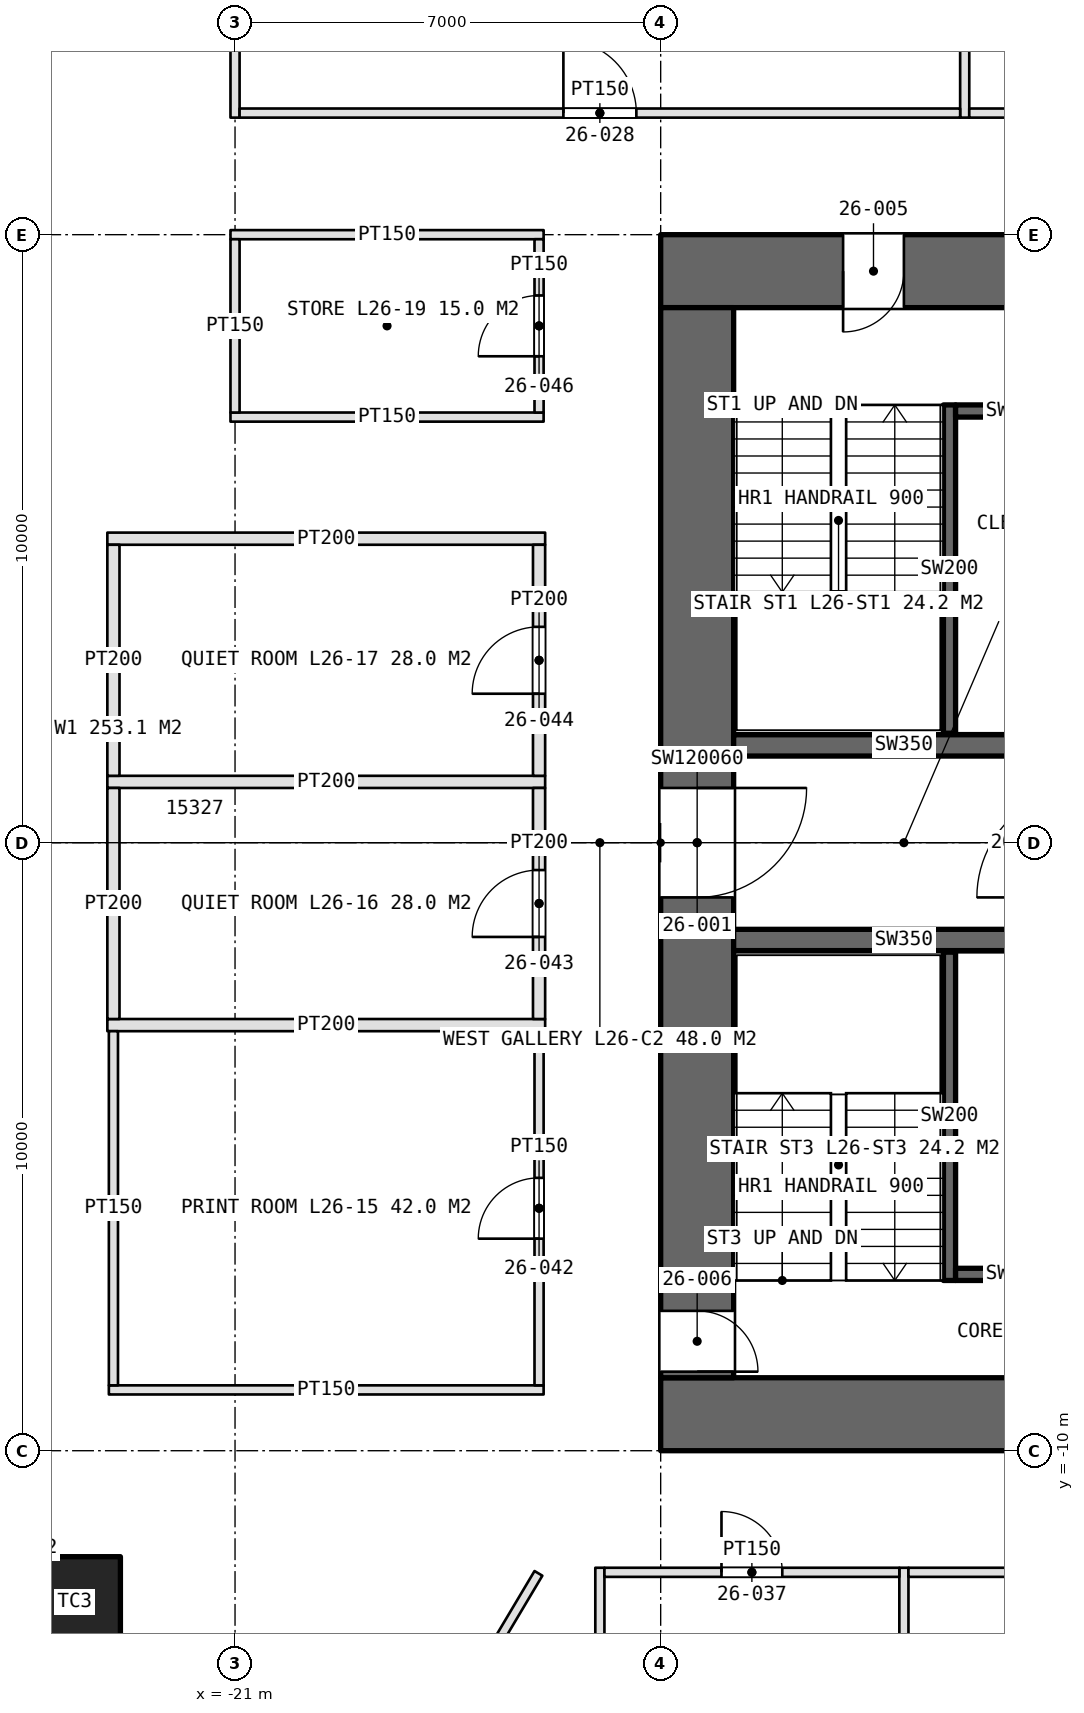
"""IFC4 building model, lengths in metres.
Left out: names, types, materials, properties, quantities, classifications, styles, units other than length and angle.
Written with IfcOpenShell. Run it as: python <this file> out.ifc"""

import sys

from ifc_helpers import new_model, si_unit, direction, frame, frame_2d, origin, origin_2d, place, context, subcontext, project, spatial, rectangle, extrude, element, fill, save


model = new_model("IFC4")
c1 = context("Model", 3, precision=1e-05, world=origin(), true_north=direction((0.0, 1.0)))
c2 = subcontext(c1, "Body", "Model", "MODEL_VIEW")
j1 = project(units=[si_unit("LENGTHUNIT", "METRE"), si_unit("PLANEANGLEUNIT", "RADIAN")], contexts=[c1])
p1 = place(None, origin())
s1 = spatial("IfcSite", under=j1, at=p1, CompositionType="ELEMENT")
p2 = place(p1, origin())
s2 = spatial("IfcBuilding", under=s1, at=p2, CompositionType="ELEMENT")
p3 = place(p2, frame((0.0, 0.0, 126.0)))
s3 = spatial("IfcBuildingStorey", under=s2, at=p3, CompositionType="ELEMENT", Elevation=126.0)
p4 = place(p3, frame((-14.0, -9.4, 0.0), z_axis=(0.0, 0.0, 1.0), x_axis=(1.0, 0.0, 0.0)))
e1 = element("IfcWall", 1, at=p4, inside=s3, PredefinedType="SHEAR", context=c2, shape_type="SweptSolid", body=[
    extrude(rectangle(XDim=28.0, YDim=1.2, at=frame_2d((14.0, 0.0))), origin(), (0.0, 0.0, 1.0), 4.2),
])
p5 = place(p4, frame((13.1, 0.0, 0.0)))
e2 = element("IfcOpeningElement", 2, at=p5, cuts=e1, PredefinedType="OPENING", context=c2, shape_type="SweptSolid", body=[
    extrude(rectangle(XDim=1.8, YDim=2.4, at=frame_2d((0.9, 1.2))), frame((0.0, 0.61, 0.0), z_axis=(0.0, -1.0, 0.0), x_axis=(1.0, 0.0, 0.0)), (0.0, 0.0, 1.0), 1.22),
])
p6 = place(p4, frame((22.9, 0.0, 0.0)))
e3 = element("IfcOpeningElement", 3, at=p6, cuts=e1, PredefinedType="OPENING", context=c2, shape_type="SweptSolid", body=[
    extrude(rectangle(XDim=2.2, YDim=2.7, at=frame_2d((1.1, 1.35))), frame((0.0, 0.61, 0.0), z_axis=(0.0, -1.0, 0.0), x_axis=(1.0, 0.0, 0.0)), (0.0, 0.0, 1.0), 1.22),
])
p7 = place(p3, frame((14.0, 9.4, 0.0), z_axis=(0.0, 0.0, 1.0), x_axis=(-1.0, 0.0, 0.0)))
e4 = element("IfcWall", 4, at=p7, inside=s3, PredefinedType="SHEAR", context=c2, shape_type="SweptSolid", body=[
    extrude(rectangle(XDim=28.0, YDim=1.2, at=frame_2d((14.0, 0.0))), origin(), (0.0, 0.0, 1.0), 4.2),
])
p8 = place(p7, frame((24.0, 0.0, 0.0)))
e5 = element("IfcOpeningElement", 5, at=p8, cuts=e4, PredefinedType="OPENING", context=c2, shape_type="SweptSolid", body=[
    extrude(rectangle(XDim=1.0, YDim=2.4, at=frame_2d((0.5, 1.2))), frame((0.0, 0.61, 0.0), z_axis=(0.0, -1.0, 0.0), x_axis=(1.0, 0.0, 0.0)), (0.0, 0.0, 1.0), 1.22),
])
p9 = place(p7, frame((13.1, 0.0, 0.0)))
e6 = element("IfcOpeningElement", 6, at=p9, cuts=e4, PredefinedType="OPENING", context=c2, shape_type="SweptSolid", body=[
    extrude(rectangle(XDim=1.8, YDim=2.4, at=frame_2d((0.9, 1.2))), frame((0.0, 0.61, 0.0), z_axis=(0.0, -1.0, 0.0), x_axis=(1.0, 0.0, 0.0)), (0.0, 0.0, 1.0), 1.22),
])
p10 = place(p3, frame((-13.4, 8.8, 0.0), z_axis=(0.0, 0.0, 1.0), x_axis=(0.0, -1.0, 0.0)))
e7 = element("IfcWall", 7, at=p10, inside=s3, PredefinedType="SHEAR", context=c2, shape_type="SweptSolid", body=[
    extrude(rectangle(XDim=17.6, YDim=1.2, at=frame_2d((8.8, 0.0))), origin(), (0.0, 0.0, 1.0), 4.2),
])
p11 = place(p10, frame((7.9, 0.0, 0.0)))
e8 = element("IfcOpeningElement", 8, at=p11, cuts=e7, PredefinedType="OPENING", context=c2, shape_type="SweptSolid", body=[
    extrude(rectangle(XDim=1.8, YDim=2.4, at=frame_2d((0.9, 1.2))), frame((0.0, 0.61, 0.0), z_axis=(0.0, -1.0, 0.0), x_axis=(1.0, 0.0, 0.0)), (0.0, 0.0, 1.0), 1.22),
])
p12 = place(p10, frame((16.5, 0.0, 0.0)))
e9 = element("IfcOpeningElement", 9, at=p12, cuts=e7, PredefinedType="OPENING", context=c2, shape_type="SweptSolid", body=[
    extrude(rectangle(XDim=1.0, YDim=2.4, at=frame_2d((0.5, 1.2))), frame((0.0, 0.61, 0.0), z_axis=(0.0, -1.0, 0.0), x_axis=(1.0, 0.0, 0.0)), (0.0, 0.0, 1.0), 1.22),
])
for number, where, z_axis, x_axis in (
    (10, (-12.8, 1.6, 0.0), (0.0, 0.0, 1.0), (1.0, 0.0, 0.0)),
    (11, (-12.8, -1.6, 0.0), (0.0, 0.0, 1.0), (1.0, 0.0, 0.0)),
):
    element("IfcWall", number, at=place(p3, frame(where, z_axis=z_axis, x_axis=x_axis)), inside=s3, PredefinedType="SHEAR", context=c2, shape_type="SweptSolid", body=[
        extrude(rectangle(XDim=5.6, YDim=0.35, at=frame_2d((2.8, 0.0))), origin(), (0.0, 0.0, 1.0), 4.2),
    ])
p13 = place(p3, frame((-23.635, -12.493, 0.0), z_axis=(0.0, 0.0, 1.0), x_axis=(1.0, 0.0, 0.0)))
e12 = element("IfcColumn", 12, at=p13, inside=s3, PredefinedType="COLUMN", context=c2, shape_type="SweptSolid", body=[
    extrude(rectangle(XDim=1.5, YDim=1.5, at=origin_2d()), origin(), (0.0, 0.0, 1.0), 4.2),
])
p14 = place(p3, frame((-9.25, 7.2, 0.0), z_axis=(0.0, 0.0, 1.0), x_axis=(0.0, -1.0, 0.0)))
e13 = element("IfcWall", 13, at=p14, inside=s3, PredefinedType="SOLIDWALL", context=c2, shape_type="SweptSolid", body=[
    extrude(rectangle(XDim=5.4, YDim=0.2, at=frame_2d((2.7, 0.0))), origin(), (0.0, 0.0, 1.0), 4.2),
])
p15 = place(p3, frame((-9.15, 7.1, 0.0), z_axis=(0.0, 0.0, 1.0), x_axis=(1.0, 0.0, 0.0)))
e14 = element("IfcWall", 14, at=p15, inside=s3, PredefinedType="SOLIDWALL", context=c2, shape_type="SweptSolid", body=[
    extrude(rectangle(XDim=1.95, YDim=0.2, at=frame_2d((0.975, 0.0))), origin(), (0.0, 0.0, 1.0), 4.2),
])
p16 = place(p3, frame((-9.25, -7.2, 0.0), z_axis=(0.0, 0.0, 1.0), x_axis=(0.0, 1.0, 0.0)))
e15 = element("IfcWall", 15, at=p16, inside=s3, PredefinedType="SOLIDWALL", context=c2, shape_type="SweptSolid", body=[
    extrude(rectangle(XDim=5.4, YDim=0.2, at=frame_2d((2.7, 0.0))), origin(), (0.0, 0.0, 1.0), 4.2),
])
p17 = place(p3, frame((-9.15, -7.1, 0.0), z_axis=(0.0, 0.0, 1.0), x_axis=(1.0, 0.0, 0.0)))
e16 = element("IfcWall", 16, at=p17, inside=s3, PredefinedType="SOLIDWALL", context=c2, shape_type="SweptSolid", body=[
    extrude(rectangle(XDim=1.95, YDim=0.2, at=frame_2d((0.975, 0.0))), origin(), (0.0, 0.0, 1.0), 4.2),
])
for number, where, z_axis, x_axis in (
    (17, (-21.0, 11.925, 0.0), (0.0, 0.0, 1.0), (0.0, 1.0, 0.0)),
    (18, (-9.0, 11.925, 0.0), (0.0, 0.0, 1.0), (0.0, 1.0, 0.0)),
):
    element("IfcWall", number, at=place(p3, frame(where, z_axis=z_axis, x_axis=x_axis)), inside=s3, PredefinedType="PARTITIONING", context=c2, shape_type="SweptSolid", body=[
        extrude(rectangle(XDim=6.15, YDim=0.15, at=frame_2d((3.075, 0.0))), origin(), (0.0, 0.0, 1.0), 3.0),
    ])
p18 = place(p3, frame((-20.925, 12.0, 0.0), z_axis=(0.0, 0.0, 1.0), x_axis=(1.0, 0.0, 0.0)))
e19 = element("IfcWall", 19, at=p18, inside=s3, PredefinedType="PARTITIONING", context=c2, shape_type="SweptSolid", body=[
    extrude(rectangle(XDim=11.85, YDim=0.15, at=frame_2d((5.925, 0.0))), origin(), (0.0, 0.0, 1.0), 3.0),
])
p19 = place(p18, frame((5.325, 0.0, 0.0)))
e20 = element("IfcOpeningElement", 20, at=p19, cuts=e19, PredefinedType="OPENING", context=c2, shape_type="SweptSolid", body=[
    extrude(rectangle(XDim=1.2, YDim=2.4, at=frame_2d((0.6, 1.2))), frame((0.0, 0.085, 0.0), z_axis=(0.0, -1.0, 0.0), x_axis=(1.0, 0.0, 0.0)), (0.0, 0.0, 1.0), 0.17),
])
p20 = place(p3, frame((-8.925, 12.0, 0.0), z_axis=(0.0, 0.0, 1.0), x_axis=(1.0, 0.0, 0.0)))
e21 = element("IfcWall", 21, at=p20, inside=s3, PredefinedType="PARTITIONING", context=c2, shape_type="SweptSolid", body=[
    extrude(rectangle(XDim=4.85, YDim=0.15, at=frame_2d((2.425, 0.0))), origin(), (0.0, 0.0, 1.0), 3.0),
])
p21 = place(p20, frame((1.875, 0.0, 0.0)))
e22 = element("IfcOpeningElement", 22, at=p21, cuts=e21, PredefinedType="OPENING", context=c2, shape_type="SweptSolid", body=[
    extrude(rectangle(XDim=1.1, YDim=2.3, at=frame_2d((0.55, 1.15))), frame((0.0, 0.085, 0.0), z_axis=(0.0, -1.0, 0.0), x_axis=(1.0, 0.0, 0.0)), (0.0, 0.0, 1.0), 0.17),
])
for number, where, z_axis, x_axis in (
    (23, (-15.0, -11.925, 0.0), (0.0, 0.0, 1.0), (0.0, -1.0, 0.0)),
    (24, (-10.0, -11.925, 0.0), (0.0, 0.0, 1.0), (0.0, -1.0, 0.0)),
):
    element("IfcWall", number, at=place(p3, frame(where, z_axis=z_axis, x_axis=x_axis)), inside=s3, PredefinedType="PARTITIONING", context=c2, shape_type="SweptSolid", body=[
        extrude(rectangle(XDim=8.15, YDim=0.15, at=frame_2d((4.075, 0.0))), origin(), (0.0, 0.0, 1.0), 3.0),
    ])
p22 = place(p3, frame((-14.925, -12.0, 0.0), z_axis=(0.0, 0.0, 1.0), x_axis=(1.0, 0.0, 0.0)))
e25 = element("IfcWall", 25, at=p22, inside=s3, PredefinedType="PARTITIONING", context=c2, shape_type="SweptSolid", body=[
    extrude(rectangle(XDim=4.85, YDim=0.15, at=frame_2d((2.425, 0.0))), origin(), (0.0, 0.0, 1.0), 3.0),
])
p23 = place(p22, frame((1.925, 0.0, 0.0)))
e26 = element("IfcOpeningElement", 26, at=p23, cuts=e25, PredefinedType="OPENING", context=c2, shape_type="SweptSolid", body=[
    extrude(rectangle(XDim=1.0, YDim=2.2, at=frame_2d((0.5, 1.1))), frame((0.0, 0.085, 0.0), z_axis=(0.0, -1.0, 0.0), x_axis=(1.0, 0.0, 0.0)), (0.0, 0.0, 1.0), 0.17),
])
p24 = place(p3, frame((-9.925, -12.0, 0.0), z_axis=(0.0, 0.0, 1.0), x_axis=(1.0, 0.0, 0.0)))
e27 = element("IfcWall", 27, at=p24, inside=s3, PredefinedType="PARTITIONING", context=c2, shape_type="SweptSolid", body=[
    extrude(rectangle(XDim=5.85, YDim=0.15, at=frame_2d((2.925, 0.0))), origin(), (0.0, 0.0, 1.0), 3.0),
])
p25 = place(p24, frame((2.425, 0.0, 0.0)))
e28 = element("IfcOpeningElement", 28, at=p25, cuts=e27, PredefinedType="OPENING", context=c2, shape_type="SweptSolid", body=[
    extrude(rectangle(XDim=1.0, YDim=2.2, at=frame_2d((0.5, 1.1))), frame((0.0, 0.085, 0.0), z_axis=(0.0, -1.0, 0.0), x_axis=(1.0, 0.0, 0.0)), (0.0, 0.0, 1.0), 0.17),
])
p26 = place(p3, frame((-15.925, -9.0, 0.0), z_axis=(0.0, 0.0, 1.0), x_axis=(-1.0, 0.0, 0.0)))
e29 = element("IfcWall", 29, at=p26, inside=s3, PredefinedType="PARTITIONING", context=c2, shape_type="SweptSolid", body=[
    extrude(rectangle(XDim=7.15, YDim=0.15, at=frame_2d((3.575, 0.0))), origin(), (0.0, 0.0, 1.0), 3.0),
])
for number, where, z_axis, x_axis in (
    (30, (-15.9, -3.0, 0.0), (0.0, 0.0, 1.0), (-1.0, 0.0, 0.0)),
    (31, (-15.9, 1.0, 0.0), (0.0, 0.0, 1.0), (-1.0, 0.0, 0.0)),
    (32, (-15.9, 5.0, 0.0), (0.0, 0.0, 1.0), (-1.0, 0.0, 0.0)),
):
    element("IfcWall", number, at=place(p3, frame(where, z_axis=z_axis, x_axis=x_axis)), inside=s3, PredefinedType="PARTITIONING", context=c2, shape_type="SweptSolid", body=[
        extrude(rectangle(XDim=7.2, YDim=0.2, at=frame_2d((3.6, 0.0))), origin(), (0.0, 0.0, 1.0), 3.0),
    ])
p27 = place(p3, frame((-16.0, -8.925, 0.0), z_axis=(0.0, 0.0, 1.0), x_axis=(0.0, 1.0, 0.0)))
e33 = element("IfcWall", 33, at=p27, inside=s3, PredefinedType="PARTITIONING", context=c2, shape_type="SweptSolid", body=[
    extrude(rectangle(XDim=5.825, YDim=0.15, at=frame_2d((2.913, 0.0))), origin(), (0.0, 0.0, 1.0), 3.0),
])
p28 = place(p27, frame((2.413, 0.0, 0.0)))
e34 = element("IfcOpeningElement", 34, at=p28, cuts=e33, PredefinedType="OPENING", context=c2, shape_type="SweptSolid", body=[
    extrude(rectangle(XDim=1.0, YDim=2.2, at=frame_2d((0.5, 1.1))), frame((0.0, 0.085, 0.0), z_axis=(0.0, -1.0, 0.0), x_axis=(1.0, 0.0, 0.0)), (0.0, 0.0, 1.0), 0.17),
])
p29 = place(p3, frame((-23.0, -8.925, 0.0), z_axis=(0.0, 0.0, 1.0), x_axis=(0.0, 1.0, 0.0)))
e35 = element("IfcWall", 35, at=p29, inside=s3, PredefinedType="PARTITIONING", context=c2, shape_type="SweptSolid", body=[
    extrude(rectangle(XDim=5.825, YDim=0.15, at=frame_2d((2.913, 0.0))), origin(), (0.0, 0.0, 1.0), 3.0),
])
p30 = place(p3, frame((-16.0, -2.9, 0.0), z_axis=(0.0, 0.0, 1.0), x_axis=(0.0, 1.0, 0.0)))
e36 = element("IfcWall", 36, at=p30, inside=s3, PredefinedType="PARTITIONING", context=c2, shape_type="SweptSolid", body=[
    extrude(rectangle(XDim=3.8, YDim=0.2, at=frame_2d((1.9, 0.0))), origin(), (0.0, 0.0, 1.0), 3.0),
])
p31 = place(p30, frame((1.35, 0.0, 0.0)))
e37 = element("IfcOpeningElement", 37, at=p31, cuts=e36, PredefinedType="OPENING", context=c2, shape_type="SweptSolid", body=[
    extrude(rectangle(XDim=1.1, YDim=2.3, at=frame_2d((0.55, 1.15))), frame((0.0, 0.11, 0.0), z_axis=(0.0, -1.0, 0.0), x_axis=(1.0, 0.0, 0.0)), (0.0, 0.0, 1.0), 0.22),
])
p32 = place(p3, frame((-23.0, -2.9, 0.0), z_axis=(0.0, 0.0, 1.0), x_axis=(0.0, 1.0, 0.0)))
e38 = element("IfcWall", 38, at=p32, inside=s3, PredefinedType="PARTITIONING", context=c2, shape_type="SweptSolid", body=[
    extrude(rectangle(XDim=3.8, YDim=0.2, at=frame_2d((1.9, 0.0))), origin(), (0.0, 0.0, 1.0), 3.0),
])
p33 = place(p3, frame((-16.0, 1.1, 0.0), z_axis=(0.0, 0.0, 1.0), x_axis=(0.0, 1.0, 0.0)))
e39 = element("IfcWall", 39, at=p33, inside=s3, PredefinedType="PARTITIONING", context=c2, shape_type="SweptSolid", body=[
    extrude(rectangle(XDim=3.8, YDim=0.2, at=frame_2d((1.9, 0.0))), origin(), (0.0, 0.0, 1.0), 3.0),
])
p34 = place(p33, frame((1.35, 0.0, 0.0)))
e40 = element("IfcOpeningElement", 40, at=p34, cuts=e39, PredefinedType="OPENING", context=c2, shape_type="SweptSolid", body=[
    extrude(rectangle(XDim=1.1, YDim=2.3, at=frame_2d((0.55, 1.15))), frame((0.0, 0.11, 0.0), z_axis=(0.0, -1.0, 0.0), x_axis=(1.0, 0.0, 0.0)), (0.0, 0.0, 1.0), 0.22),
])
p35 = place(p3, frame((-23.0, 1.1, 0.0), z_axis=(0.0, 0.0, 1.0), x_axis=(0.0, 1.0, 0.0)))
e41 = element("IfcWall", 41, at=p35, inside=s3, PredefinedType="PARTITIONING", context=c2, shape_type="SweptSolid", body=[
    extrude(rectangle(XDim=3.8, YDim=0.2, at=frame_2d((1.9, 0.0))), origin(), (0.0, 0.0, 1.0), 3.0),
])
for number, where, z_axis, x_axis in (
    (42, (-15.925, 7.0, 0.0), (0.0, 0.0, 1.0), (-1.0, 0.0, 0.0)),
    (43, (-15.925, 10.0, 0.0), (0.0, 0.0, 1.0), (-1.0, 0.0, 0.0)),
):
    element("IfcWall", number, at=place(p3, frame(where, z_axis=z_axis, x_axis=x_axis)), inside=s3, PredefinedType="PARTITIONING", context=c2, shape_type="SweptSolid", body=[
        extrude(rectangle(XDim=5.15, YDim=0.15, at=frame_2d((2.575, 0.0))), origin(), (0.0, 0.0, 1.0), 3.0),
    ])
p36 = place(p3, frame((-16.0, 7.075, 0.0), z_axis=(0.0, 0.0, 1.0), x_axis=(0.0, 1.0, 0.0)))
e44 = element("IfcWall", 44, at=p36, inside=s3, PredefinedType="PARTITIONING", context=c2, shape_type="SweptSolid", body=[
    extrude(rectangle(XDim=2.85, YDim=0.15, at=frame_2d((1.425, 0.0))), origin(), (0.0, 0.0, 1.0), 3.0),
])
p37 = place(p36, frame((0.925, 0.0, 0.0)))
e45 = element("IfcOpeningElement", 45, at=p37, cuts=e44, PredefinedType="OPENING", context=c2, shape_type="SweptSolid", body=[
    extrude(rectangle(XDim=1.0, YDim=2.2, at=frame_2d((0.5, 1.1))), frame((0.0, 0.085, 0.0), z_axis=(0.0, -1.0, 0.0), x_axis=(1.0, 0.0, 0.0)), (0.0, 0.0, 1.0), 0.17),
])
p38 = place(p3, frame((-21.0, 7.075, 0.0), z_axis=(0.0, 0.0, 1.0), x_axis=(0.0, 1.0, 0.0)))
e46 = element("IfcWall", 46, at=p38, inside=s3, PredefinedType="PARTITIONING", context=c2, shape_type="SweptSolid", body=[
    extrude(rectangle(XDim=2.85, YDim=0.15, at=frame_2d((1.425, 0.0))), origin(), (0.0, 0.0, 1.0), 3.0),
])
p39 = place(p3, frame((-16.01, -12.017, 0.0), z_axis=(0.0, 0.0, 1.0), x_axis=(-0.511508688443, -0.85927810495, 0.0)))
e47 = element("IfcWall", 47, at=p39, inside=s3, PredefinedType="PARTITIONING", context=c2, shape_type="SweptSolid", body=[
    extrude(rectangle(XDim=8.47, YDim=0.15, at=frame_2d((4.235, 0.0))), origin(), (0.0, 0.0, 1.0), 3.0),
])
p40 = place(p11, origin())
e48 = element("IfcDoor", 48, at=p40, inside=s3, OperationType="DOUBLE_DOOR_SINGLE_SWING", PredefinedType="DOOR", context=c2, shape_type="SweptSolid", body=[
    extrude(rectangle(XDim=1.8, YDim=2.4, at=frame_2d((0.9, 1.2))), frame((0.0, 0.025, 0.0), z_axis=(0.0, -1.0, 0.0), x_axis=(1.0, 0.0, 0.0)), (0.0, 0.0, 1.0), 0.05),
])
fill(e8, e48)
p41 = place(p8, origin())
e49 = element("IfcDoor", 49, at=p41, inside=s3, OperationType="SINGLE_SWING_RIGHT", PredefinedType="DOOR", context=c2, shape_type="SweptSolid", body=[
    extrude(rectangle(XDim=1.0, YDim=2.4, at=frame_2d((0.5, 1.2))), frame((0.0, 0.025, 0.0), z_axis=(0.0, -1.0, 0.0), x_axis=(1.0, 0.0, 0.0)), (0.0, 0.0, 1.0), 0.05),
])
fill(e5, e49)
p42 = place(p12, origin())
e50 = element("IfcDoor", 50, at=p42, inside=s3, OperationType="SINGLE_SWING_RIGHT", PredefinedType="DOOR", context=c2, shape_type="SweptSolid", body=[
    extrude(rectangle(XDim=1.0, YDim=2.4, at=frame_2d((0.5, 1.2))), frame((0.0, 0.025, 0.0), z_axis=(0.0, -1.0, 0.0), x_axis=(1.0, 0.0, 0.0)), (0.0, 0.0, 1.0), 0.05),
])
fill(e9, e50)
p43 = place(p19, origin())
e51 = element("IfcDoor", 51, at=p43, inside=s3, OperationType="SINGLE_SWING_LEFT", PredefinedType="DOOR", context=c2, shape_type="SweptSolid", body=[
    extrude(rectangle(XDim=1.2, YDim=2.4, at=frame_2d((0.6, 1.2))), frame((0.0, 0.025, 0.0), z_axis=(0.0, -1.0, 0.0), x_axis=(1.0, 0.0, 0.0)), (0.0, 0.0, 1.0), 0.05),
])
fill(e20, e51)
p44 = place(p23, origin())
e52 = element("IfcDoor", 52, at=p44, inside=s3, OperationType="SINGLE_SWING_LEFT", PredefinedType="DOOR", context=c2, shape_type="SweptSolid", body=[
    extrude(rectangle(XDim=1.0, YDim=2.2, at=frame_2d((0.5, 1.1))), frame((0.0, 0.025, 0.0), z_axis=(0.0, -1.0, 0.0), x_axis=(1.0, 0.0, 0.0)), (0.0, 0.0, 1.0), 0.05),
])
fill(e26, e52)
p45 = place(p28, origin())
e53 = element("IfcDoor", 53, at=p45, inside=s3, OperationType="SINGLE_SWING_LEFT", PredefinedType="DOOR", context=c2, shape_type="SweptSolid", body=[
    extrude(rectangle(XDim=1.0, YDim=2.2, at=frame_2d((0.5, 1.1))), frame((0.0, 0.025, 0.0), z_axis=(0.0, -1.0, 0.0), x_axis=(1.0, 0.0, 0.0)), (0.0, 0.0, 1.0), 0.05),
])
fill(e34, e53)
p46 = place(p31, origin())
e54 = element("IfcDoor", 54, at=p46, inside=s3, OperationType="SINGLE_SWING_LEFT", PredefinedType="DOOR", context=c2, shape_type="SweptSolid", body=[
    extrude(rectangle(XDim=1.1, YDim=2.3, at=frame_2d((0.55, 1.15))), frame((0.0, 0.025, 0.0), z_axis=(0.0, -1.0, 0.0), x_axis=(1.0, 0.0, 0.0)), (0.0, 0.0, 1.0), 0.05),
])
fill(e37, e54)
p47 = place(p34, origin())
e55 = element("IfcDoor", 55, at=p47, inside=s3, OperationType="SINGLE_SWING_LEFT", PredefinedType="DOOR", context=c2, shape_type="SweptSolid", body=[
    extrude(rectangle(XDim=1.1, YDim=2.3, at=frame_2d((0.55, 1.15))), frame((0.0, 0.025, 0.0), z_axis=(0.0, -1.0, 0.0), x_axis=(1.0, 0.0, 0.0)), (0.0, 0.0, 1.0), 0.05),
])
fill(e40, e55)
p48 = place(p37, origin())
e56 = element("IfcDoor", 56, at=p48, inside=s3, OperationType="SINGLE_SWING_LEFT", PredefinedType="DOOR", context=c2, shape_type="SweptSolid", body=[
    extrude(rectangle(XDim=1.0, YDim=2.2, at=frame_2d((0.5, 1.1))), frame((0.0, 0.025, 0.0), z_axis=(0.0, -1.0, 0.0), x_axis=(1.0, 0.0, 0.0)), (0.0, 0.0, 1.0), 0.05),
])
fill(e45, e56)
save(model, sys.argv[1])
